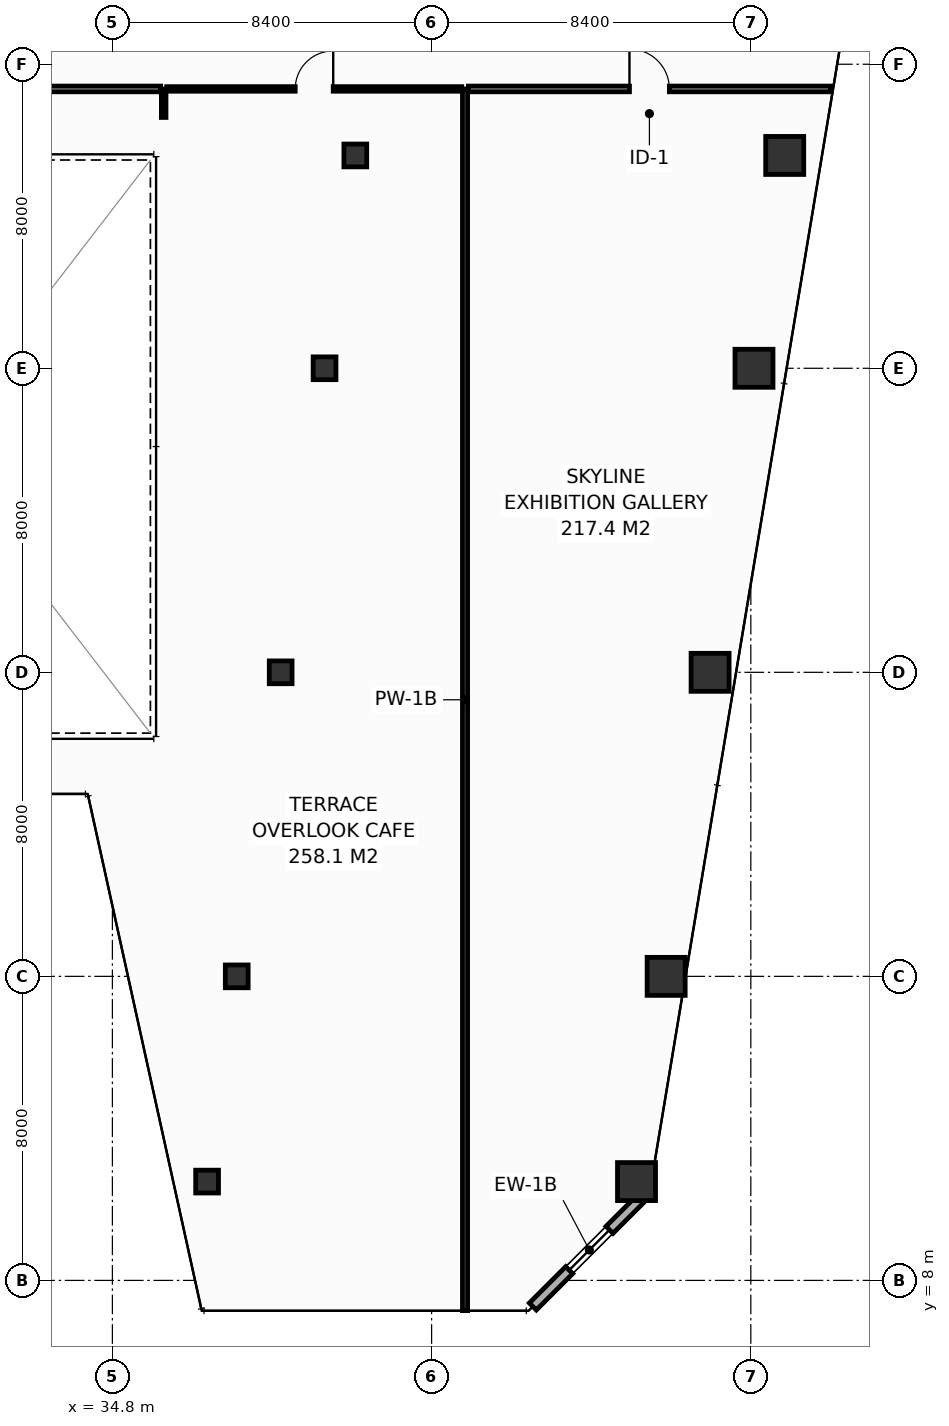
"""IFC4 building model, lengths in metres.
Left out: names, types, materials, properties, quantities, classifications, styles, units other than length and angle.
Written with IfcOpenShell. Run it as: python <this file> out.ifc"""

import sys

from ifc_helpers import new_model, si_unit, direction, frame, frame_2d, origin, origin_2d, place, context, subcontext, project, spatial, rectangle, hollow_rectangle, extrude, element, fill, save


model = new_model("IFC4")
c1 = context("Model", 3, precision=1e-05, world=origin(), true_north=direction((0.0, 1.0)))
c2 = subcontext(c1, "Body", "Model", "MODEL_VIEW")
j1 = project(units=[si_unit("LENGTHUNIT", "METRE"), si_unit("PLANEANGLEUNIT", "RADIAN")], contexts=[c1])
p1 = place(None, origin())
s1 = spatial("IfcSite", under=j1, at=p1, CompositionType="ELEMENT")
p2 = place(p1, origin())
s2 = spatial("IfcBuilding", under=s1, at=p2, CompositionType="ELEMENT")
p3 = place(p2, frame((0.0, 0.0, 110.4)))
s3 = spatial("IfcBuildingStorey", under=s2, at=p3, CompositionType="ELEMENT", Elevation=110.4)
p4 = place(p3, frame((48.592, 10.6, 0.0), z_axis=(0.0, 0.0, 1.0), x_axis=(1.0, 0.0, 0.0)))
e1 = element("IfcColumn", 1, at=p4, inside=s3, PredefinedType="COLUMN", context=c2, shape_type="SweptSolid", body=[
    extrude(hollow_rectangle(XDim=1.0, YDim=1.0, WallThickness=0.045, at=origin_2d()), origin(), (0.0, 0.0, 1.0), 4.4),
])
p5 = place(p3, frame((37.292, 10.6, 0.0), z_axis=(0.0, 0.0, 1.0), x_axis=(1.0, 0.0, 0.0)))
e2 = element("IfcColumn", 2, at=p5, inside=s3, PredefinedType="COLUMN", context=c2, shape_type="SweptSolid", body=[
    extrude(hollow_rectangle(XDim=0.6, YDim=0.6, WallThickness=0.028, at=origin_2d()), origin(), (0.0, 0.0, 1.0), 4.4),
])
p6 = place(p3, frame((49.372, 16.0, 0.0), z_axis=(0.0, 0.0, 1.0), x_axis=(1.0, 0.0, 0.0)))
e3 = element("IfcColumn", 3, at=p6, inside=s3, PredefinedType="COLUMN", context=c2, shape_type="SweptSolid", body=[
    extrude(hollow_rectangle(XDim=1.0, YDim=1.0, WallThickness=0.045, at=origin_2d()), origin(), (0.0, 0.0, 1.0), 4.4),
])
p7 = place(p3, frame((38.072, 16.0, 0.0), z_axis=(0.0, 0.0, 1.0), x_axis=(1.0, 0.0, 0.0)))
e4 = element("IfcColumn", 4, at=p7, inside=s3, PredefinedType="COLUMN", context=c2, shape_type="SweptSolid", body=[
    extrude(hollow_rectangle(XDim=0.6, YDim=0.6, WallThickness=0.028, at=origin_2d()), origin(), (0.0, 0.0, 1.0), 4.4),
])
p8 = place(p3, frame((50.528, 24.0, 0.0), z_axis=(0.0, 0.0, 1.0), x_axis=(1.0, 0.0, 0.0)))
e5 = element("IfcColumn", 5, at=p8, inside=s3, PredefinedType="COLUMN", context=c2, shape_type="SweptSolid", body=[
    extrude(hollow_rectangle(XDim=1.0, YDim=1.0, WallThickness=0.045, at=origin_2d()), origin(), (0.0, 0.0, 1.0), 4.4),
])
p9 = place(p3, frame((39.228, 24.0, 0.0), z_axis=(0.0, 0.0, 1.0), x_axis=(1.0, 0.0, 0.0)))
e6 = element("IfcColumn", 6, at=p9, inside=s3, PredefinedType="COLUMN", context=c2, shape_type="SweptSolid", body=[
    extrude(hollow_rectangle(XDim=0.6, YDim=0.6, WallThickness=0.028, at=origin_2d()), origin(), (0.0, 0.0, 1.0), 4.4),
])
p10 = place(p3, frame((51.683, 32.0, 0.0), z_axis=(0.0, 0.0, 1.0), x_axis=(1.0, 0.0, 0.0)))
e7 = element("IfcColumn", 7, at=p10, inside=s3, PredefinedType="COLUMN", context=c2, shape_type="SweptSolid", body=[
    extrude(hollow_rectangle(XDim=1.0, YDim=1.0, WallThickness=0.045, at=origin_2d()), origin(), (0.0, 0.0, 1.0), 4.4),
])
p11 = place(p3, frame((40.383, 32.0, 0.0), z_axis=(0.0, 0.0, 1.0), x_axis=(1.0, 0.0, 0.0)))
e8 = element("IfcColumn", 8, at=p11, inside=s3, PredefinedType="COLUMN", context=c2, shape_type="SweptSolid", body=[
    extrude(hollow_rectangle(XDim=0.6, YDim=0.6, WallThickness=0.028, at=origin_2d()), origin(), (0.0, 0.0, 1.0), 4.4),
])
p12 = place(p3, frame((52.492, 37.6, 0.0), z_axis=(0.0, 0.0, 1.0), x_axis=(1.0, 0.0, 0.0)))
e9 = element("IfcColumn", 9, at=p12, inside=s3, PredefinedType="COLUMN", context=c2, shape_type="SweptSolid", body=[
    extrude(hollow_rectangle(XDim=1.0, YDim=1.0, WallThickness=0.045, at=origin_2d()), origin(), (0.0, 0.0, 1.0), 4.4),
])
p13 = place(p3, frame((41.192, 37.6, 0.0), z_axis=(0.0, 0.0, 1.0), x_axis=(1.0, 0.0, 0.0)))
e10 = element("IfcColumn", 10, at=p13, inside=s3, PredefinedType="COLUMN", context=c2, shape_type="SweptSolid", body=[
    extrude(hollow_rectangle(XDim=0.6, YDim=0.6, WallThickness=0.028, at=origin_2d()), origin(), (0.0, 0.0, 1.0), 4.4),
])
p14 = place(p3, frame((45.864, 7.313, 0.0), z_axis=(0.0, 0.0, 1.0), x_axis=(0.70707775441, 0.707135806771, 0.0)))
e11 = element("IfcWall", 11, at=p14, inside=s3, PredefinedType="STANDARD", context=c2, shape_type="SweptSolid", body=[
    extrude(rectangle(XDim=4.206, YDim=0.26, at=frame_2d((2.103, 0.0))), origin(), (0.0, 0.0, 1.0), 4.15),
])
p15 = place(p14, frame((1.353, 0.0, 0.9)))
e12 = element("IfcOpeningElement", 12, at=p15, cuts=e11, PredefinedType="OPENING", context=c2, shape_type="SweptSolid", body=[
    extrude(rectangle(XDim=1.5, YDim=1.85, at=frame_2d((0.75, 0.925))), frame((0.0, 0.14, 0.0), z_axis=(0.0, -1.0, 0.0), x_axis=(1.0, 0.0, 0.0)), (0.0, 0.0, 1.0), 0.28),
])
p16 = place(p3, frame((44.08, 7.205, 0.0), z_axis=(0.0, 0.0, 1.0), x_axis=(0.0, 1.0, 0.0)))
e13 = element("IfcWall", 13, at=p16, inside=s3, PredefinedType="PARTITIONING", context=c2, shape_type="SweptSolid", body=[
    extrude(rectangle(XDim=32.145, YDim=0.135, at=frame_2d((16.073, 0.0))), origin(), (0.0, 0.0, 1.0), 3.335),
])
p17 = place(p3, frame((36.15, 38.6, 0.0), z_axis=(0.0, 0.0, 1.0), x_axis=(0.0, 1.0, 0.0)))
e14 = element("IfcWall", 14, at=p17, inside=s3, PredefinedType="PARTITIONING", context=c2, shape_type="SweptSolid", body=[
    extrude(rectangle(XDim=0.75, YDim=0.12, at=frame_2d((0.375, 0.0))), origin(), (0.0, 0.0, 1.0), 4.15),
])
p18 = place(p3, frame((23.93, 39.35, 0.0), z_axis=(0.0, 0.0, 1.0), x_axis=(1.0, 0.0, 0.0)))
e15 = element("IfcWall", 15, at=p18, inside=s3, PredefinedType="PARTITIONING", context=c2, shape_type="SweptSolid", body=[
    extrude(rectangle(XDim=12.14, YDim=0.15, at=frame_2d((6.07, 0.0))), origin(), (0.0, 0.0, 1.0), 4.15),
])
p19 = place(p3, frame((36.23, 39.35, 0.0), z_axis=(0.0, 0.0, 1.0), x_axis=(1.0, 0.0, 0.0)))
e16 = element("IfcWall", 16, at=p19, inside=s3, PredefinedType="PARTITIONING", context=c2, shape_type="SweptSolid", body=[
    extrude(rectangle(XDim=7.762, YDim=0.12, at=frame_2d((3.881, 0.0))), origin(), (0.0, 0.0, 1.0), 3.335),
])
p20 = place(p19, frame((3.381, 0.0, 0.0)))
e17 = element("IfcOpeningElement", 17, at=p20, cuts=e16, PredefinedType="OPENING", context=c2, shape_type="SweptSolid", body=[
    extrude(rectangle(XDim=1.0, YDim=2.15, at=frame_2d((0.5, 1.075))), frame((0.0, 0.07, 0.0), z_axis=(0.0, -1.0, 0.0), x_axis=(1.0, 0.0, 0.0)), (0.0, 0.0, 1.0), 0.14),
])
p21 = place(p3, frame((44.167, 39.35, 0.0), z_axis=(0.0, 0.0, 1.0), x_axis=(1.0, 0.0, 0.0)))
e18 = element("IfcWall", 18, at=p21, inside=s3, PredefinedType="PARTITIONING", context=c2, shape_type="SweptSolid", body=[
    extrude(rectangle(XDim=9.528, YDim=0.15, at=frame_2d((4.764, 0.0))), origin(), (0.0, 0.0, 1.0), 3.635),
])
p22 = place(p21, frame((4.239, 0.0, 0.0)))
e19 = element("IfcOpeningElement", 19, at=p22, cuts=e18, PredefinedType="OPENING", context=c2, shape_type="SweptSolid", body=[
    extrude(rectangle(XDim=1.05, YDim=2.15, at=frame_2d((0.525, 1.075))), frame((0.0, 0.085, 0.0), z_axis=(0.0, -1.0, 0.0), x_axis=(1.0, 0.0, 0.0)), (0.0, 0.0, 1.0), 0.17),
])
p23 = place(p15, origin())
e20 = element("IfcWindow", 20, at=p23, inside=s3, PartitioningType="SINGLE_PANEL", PredefinedType="WINDOW", context=c2, shape_type="SweptSolid", body=[
    extrude(rectangle(XDim=1.5, YDim=1.85, at=frame_2d((0.75, 0.925))), frame((0.0, 0.03, 0.0), z_axis=(0.0, -1.0, 0.0), x_axis=(1.0, 0.0, 0.0)), (0.0, 0.0, 1.0), 0.06),
])
fill(e12, e20)
p24 = place(p20, origin())
e21 = element("IfcDoor", 21, at=p24, inside=s3, OperationType="SINGLE_SWING_RIGHT", PredefinedType="DOOR", context=c2, shape_type="SweptSolid", body=[
    extrude(rectangle(XDim=1.0, YDim=2.15, at=frame_2d((0.5, 1.075))), frame((0.0, 0.025, 0.0), z_axis=(0.0, -1.0, 0.0), x_axis=(1.0, 0.0, 0.0)), (0.0, 0.0, 1.0), 0.05),
])
fill(e17, e21)
p25 = place(p22, origin())
e22 = element("IfcDoor", 22, at=p25, inside=s3, OperationType="SINGLE_SWING_LEFT", PredefinedType="DOOR", context=c2, shape_type="SweptSolid", body=[
    extrude(rectangle(XDim=1.05, YDim=2.15, at=frame_2d((0.525, 1.075))), frame((0.0, 0.025, 0.0), z_axis=(0.0, -1.0, 0.0), x_axis=(1.0, 0.0, 0.0)), (0.0, 0.0, 1.0), 0.05),
])
fill(e19, e22)
save(model, sys.argv[1])
